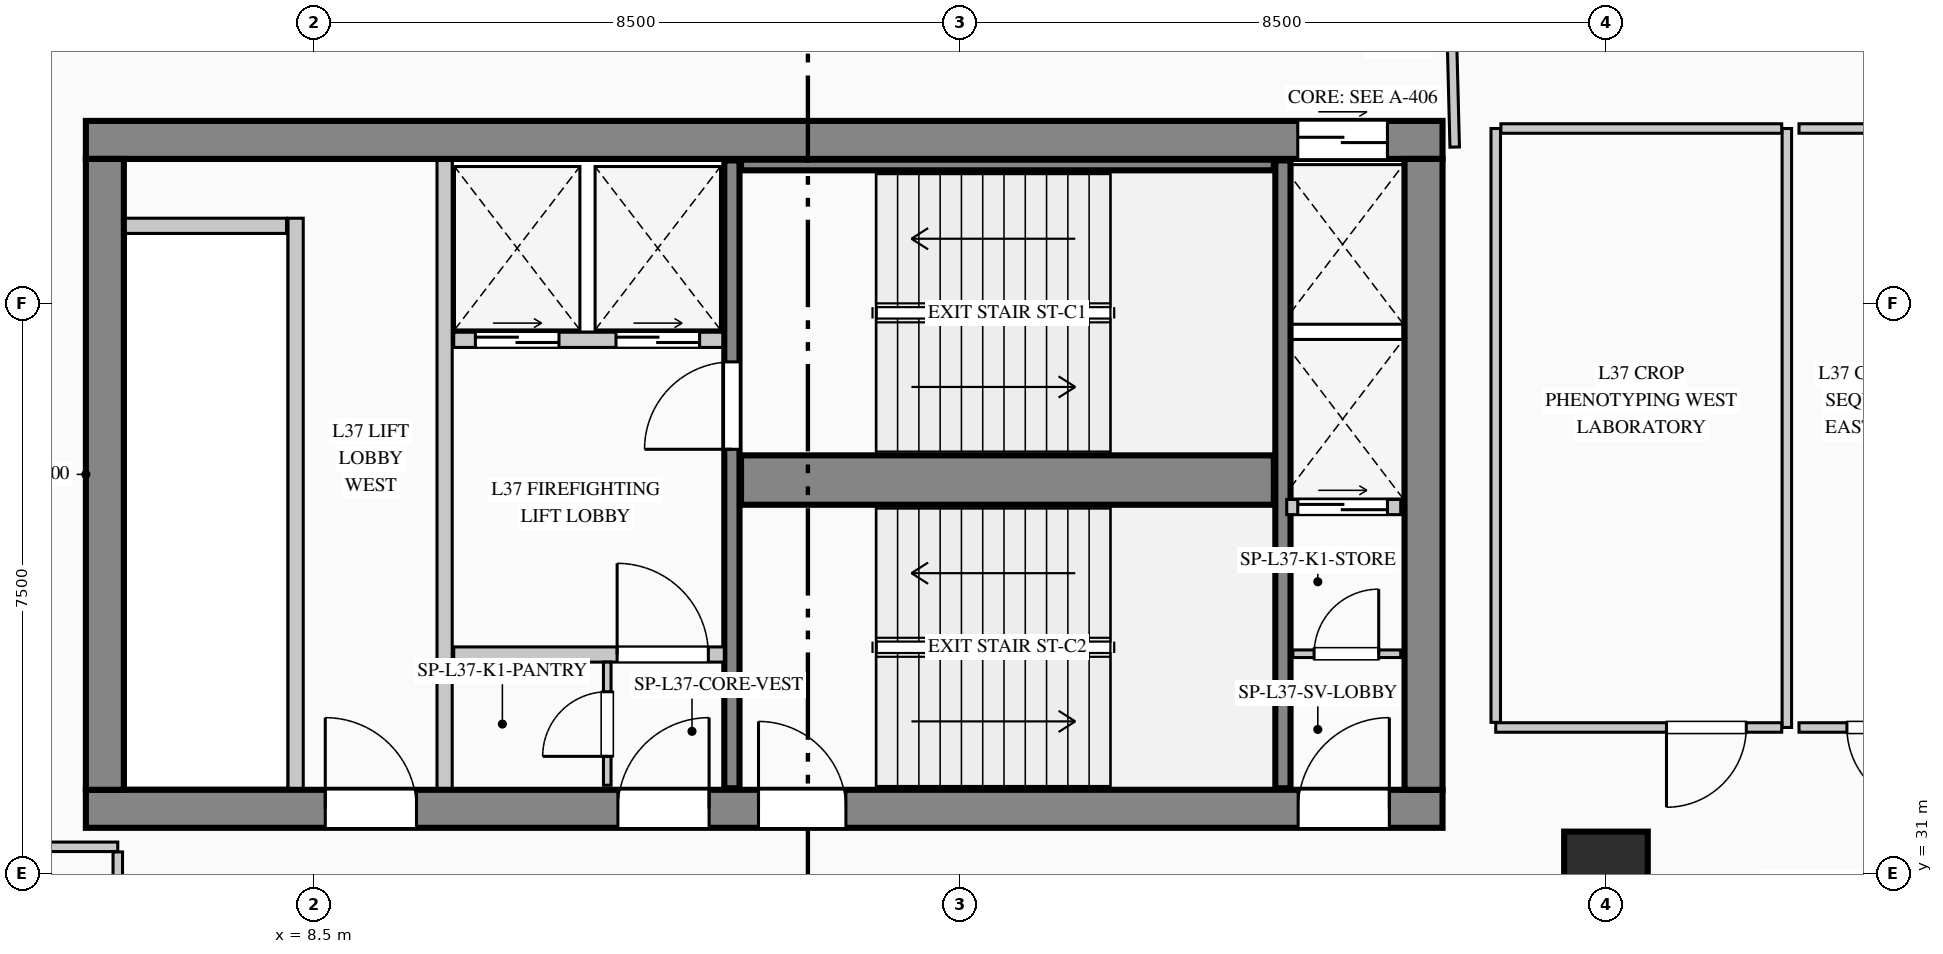
"""IFC4 building model, lengths in metres.
Left out: names, types, materials, properties, quantities, classifications, styles, units other than length and angle.
Written with IfcOpenShell. Run it as: python <this file> out.ifc"""

import sys

from ifc_helpers import new_model, si_unit, direction, frame, frame_2d, origin, origin_2d, place, context, subcontext, project, spatial, rectangle, extrude, element, fill, save


model = new_model("IFC4")
c1 = context("Model", 3, precision=1e-05, world=origin(), true_north=direction((0.0, 1.0)))
c2 = subcontext(c1, "Body", "Model", "MODEL_VIEW")
j1 = project(units=[si_unit("LENGTHUNIT", "METRE"), si_unit("PLANEANGLEUNIT", "RADIAN")], contexts=[c1])
p1 = place(None, origin())
s1 = spatial("IfcSite", under=j1, at=p1, CompositionType="ELEMENT")
p2 = place(p1, origin())
s2 = spatial("IfcBuilding", under=s1, at=p2, CompositionType="ELEMENT")
p3 = place(p2, frame((0.0, 0.0, 158.8)))
s3 = spatial("IfcBuildingStorey", under=s2, at=p3, CompositionType="ELEMENT", Elevation=158.8)
p4 = place(p3, frame((5.5, 40.65, 0.0), z_axis=(0.0, 0.0, 1.0), x_axis=(1.0, 0.0, 0.0)))
e1 = element("IfcWall", 1, at=p4, inside=s3, PredefinedType="SHEAR", context=c2, shape_type="SweptSolid", body=[
    extrude(rectangle(XDim=17.85, YDim=0.5, at=frame_2d((8.925, 0.0))), origin(), (0.0, 0.0, 1.0), 3.95),
])
p5 = place(p4, frame((15.945, 0.0, 0.0)))
e2 = element("IfcOpeningElement", 2, at=p5, cuts=e1, PredefinedType="OPENING", context=c2, shape_type="SweptSolid", body=[
    extrude(rectangle(XDim=1.18, YDim=2.25, at=frame_2d((0.59, 1.125))), frame((0.0, 0.26, 0.0), z_axis=(0.0, -1.0, 0.0), x_axis=(1.0, 0.0, 0.0)), (0.0, 0.0, 1.0), 0.52),
])
p6 = place(p3, frame((5.5, 31.85, 0.0), z_axis=(0.0, 0.0, 1.0), x_axis=(1.0, 0.0, 0.0)))
e3 = element("IfcWall", 3, at=p6, inside=s3, PredefinedType="SHEAR", context=c2, shape_type="SweptSolid", body=[
    extrude(rectangle(XDim=17.85, YDim=0.5, at=frame_2d((8.925, 0.0))), origin(), (0.0, 0.0, 1.0), 3.95),
])
p7 = place(p6, frame((3.15, 0.0, 0.0)))
e4 = element("IfcOpeningElement", 4, at=p7, cuts=e3, PredefinedType="OPENING", context=c2, shape_type="SweptSolid", body=[
    extrude(rectangle(XDim=1.2, YDim=2.2, at=frame_2d((0.6, 1.1))), frame((0.0, 0.26, 0.0), z_axis=(0.0, -1.0, 0.0), x_axis=(1.0, 0.0, 0.0)), (0.0, 0.0, 1.0), 0.52),
])
p8 = place(p6, frame((7.0, 0.0, 0.0)))
e5 = element("IfcOpeningElement", 5, at=p8, cuts=e3, PredefinedType="OPENING", context=c2, shape_type="SweptSolid", body=[
    extrude(rectangle(XDim=1.2, YDim=2.2, at=frame_2d((0.6, 1.1))), frame((0.0, 0.26, 0.0), z_axis=(0.0, -1.0, 0.0), x_axis=(1.0, 0.0, 0.0)), (0.0, 0.0, 1.0), 0.52),
])
p9 = place(p6, frame((8.85, 0.0, 0.0)))
e6 = element("IfcOpeningElement", 6, at=p9, cuts=e3, PredefinedType="OPENING", context=c2, shape_type="SweptSolid", body=[
    extrude(rectangle(XDim=1.15, YDim=2.2, at=frame_2d((0.575, 1.1))), frame((0.0, 0.26, 0.0), z_axis=(0.0, -1.0, 0.0), x_axis=(1.0, 0.0, 0.0)), (0.0, 0.0, 1.0), 0.52),
])
p10 = place(p6, frame((15.95, 0.0, 0.0)))
e7 = element("IfcOpeningElement", 7, at=p10, cuts=e3, PredefinedType="OPENING", context=c2, shape_type="SweptSolid", body=[
    extrude(rectangle(XDim=1.2, YDim=2.2, at=frame_2d((0.6, 1.1))), frame((0.0, 0.26, 0.0), z_axis=(0.0, -1.0, 0.0), x_axis=(1.0, 0.0, 0.0)), (0.0, 0.0, 1.0), 0.52),
])
for number, where, z_axis, x_axis in (
    (8, (5.75, 32.1, 0.0), (0.0, 0.0, 1.0), (0.0, 1.0, 0.0)),
    (9, (23.1, 32.1, 0.0), (0.0, 0.0, 1.0), (0.0, 1.0, 0.0)),
):
    element("IfcWall", number, at=place(p3, frame(where, z_axis=z_axis, x_axis=x_axis)), inside=s3, PredefinedType="SHEAR", context=c2, shape_type="SweptSolid", body=[
        extrude(rectangle(XDim=8.3, YDim=0.5, at=frame_2d((4.15, 0.0))), origin(), (0.0, 0.0, 1.0), 3.95),
    ])
p11 = place(p3, frame((14.0, 32.12, 0.0), z_axis=(0.0, 0.0, 1.0), x_axis=(0.0, 1.0, 0.0)))
e10 = element("IfcWall", 10, at=p11, inside=s3, PredefinedType="SHEAR", context=c2, shape_type="SweptSolid", body=[
    extrude(rectangle(XDim=8.26, YDim=0.2, at=frame_2d((4.13, 0.0))), origin(), (0.0, 0.0, 1.0), 3.95),
])
p12 = place(p11, frame((4.46, 0.0, 0.0)))
e11 = element("IfcOpeningElement", 11, at=p12, cuts=e10, PredefinedType="OPENING", context=c2, shape_type="SweptSolid", body=[
    extrude(rectangle(XDim=1.15, YDim=2.2, at=frame_2d((0.575, 1.1))), frame((0.0, 0.11, 0.0), z_axis=(0.0, -1.0, 0.0), x_axis=(1.0, 0.0, 0.0)), (0.0, 0.0, 1.0), 0.22),
])
p13 = place(p3, frame((14.12, 36.175, 0.0), z_axis=(0.0, 0.0, 1.0), x_axis=(1.0, 0.0, 0.0)))
e12 = element("IfcWall", 12, at=p13, inside=s3, PredefinedType="SHEAR", context=c2, shape_type="SweptSolid", body=[
    extrude(rectangle(XDim=7.01, YDim=0.65, at=frame_2d((3.505, 0.0))), origin(), (0.0, 0.0, 1.0), 3.95),
])
p14 = place(p3, frame((21.25, 32.12, 0.0), z_axis=(0.0, 0.0, 1.0), x_axis=(0.0, 1.0, 0.0)))
e13 = element("IfcWall", 13, at=p14, inside=s3, PredefinedType="SHEAR", context=c2, shape_type="SweptSolid", body=[
    extrude(rectangle(XDim=8.26, YDim=0.2, at=frame_2d((4.13, 0.0))), origin(), (0.0, 0.0, 1.0), 3.95),
])
p15 = place(p3, frame((14.12, 40.32, 0.0), z_axis=(0.0, 0.0, 1.0), x_axis=(1.0, 0.0, 0.0)))
e14 = element("IfcWall", 14, at=p15, inside=s3, PredefinedType="SHEAR", context=c2, shape_type="SweptSolid", body=[
    extrude(rectangle(XDim=7.01, YDim=0.14, at=frame_2d((3.505, 0.0))), origin(), (0.0, 0.0, 1.0), 3.95),
])
p16 = place(p3, frame((25.5, 31.0, 0.0), z_axis=(0.0, 0.0, 1.0), x_axis=(1.0, 0.0, 0.0)))
e15 = element("IfcColumn", 15, at=p16, inside=s3, PredefinedType="COLUMN", context=c2, shape_type="SweptSolid", body=[
    extrude(rectangle(XDim=1.1, YDim=1.1, at=origin_2d()), origin(), (0.0, 0.0, 1.0), 3.95),
])
p17 = place(p3, frame((7.993, 4.73, 0.0), z_axis=(0.0, 0.0, 1.0), x_axis=(-0.136989009016, 0.990572567462, 0.0)))
e16 = element("IfcWall", 16, at=p17, inside=s3, PredefinedType="STANDARD", context=c2, shape_type="SweptSolid", body=[
    extrude(rectangle(XDim=36.888, YDim=0.26, at=frame_2d((18.444, 0.0))), origin(), (0.0, 0.0, 1.0), 3.69),
])
p18 = place(p17, frame((20.748, 0.0, 0.9)))
e17 = element("IfcOpeningElement", 17, at=p18, cuts=e16, PredefinedType="OPENING", context=c2, shape_type="SweptSolid", body=[
    extrude(rectangle(XDim=2.1, YDim=2.0, at=frame_2d((1.05, 1.0))), frame((0.0, 0.14, 0.0), z_axis=(0.0, -1.0, 0.0), x_axis=(1.0, 0.0, 0.0)), (0.0, 0.0, 1.0), 0.28),
])
p19 = place(p3, frame((8.26, 32.12, 0.0), z_axis=(0.0, 0.0, 1.0), x_axis=(0.0, 1.0, 0.0)))
e18 = element("IfcWall", 18, at=p19, inside=s3, PredefinedType="PARTITIONING", context=c2, shape_type="SweptSolid", body=[
    extrude(rectangle(XDim=7.5, YDim=0.2, at=frame_2d((3.75, 0.0))), origin(), (0.0, 0.0, 1.0), 3.69),
])
p20 = place(p3, frame((6.02, 39.52, 0.0), z_axis=(0.0, 0.0, 1.0), x_axis=(1.0, 0.0, 0.0)))
e19 = element("IfcWall", 19, at=p20, inside=s3, PredefinedType="PARTITIONING", context=c2, shape_type="SweptSolid", body=[
    extrude(rectangle(XDim=2.12, YDim=0.2, at=frame_2d((1.06, 0.0))), origin(), (0.0, 0.0, 1.0), 3.69),
])
p21 = place(p3, frame((10.22, 32.12, 0.0), z_axis=(0.0, 0.0, 1.0), x_axis=(0.0, 1.0, 0.0)))
e20 = element("IfcWall", 20, at=p21, inside=s3, PredefinedType="PARTITIONING", context=c2, shape_type="SweptSolid", body=[
    extrude(rectangle(XDim=8.26, YDim=0.2, at=frame_2d((4.13, 0.0))), origin(), (0.0, 0.0, 1.0), 3.69),
])
p22 = place(p3, frame((10.34, 38.02, 0.0), z_axis=(0.0, 0.0, 1.0), x_axis=(1.0, 0.0, 0.0)))
e21 = element("IfcWall", 21, at=p22, inside=s3, PredefinedType="PARTITIONING", context=c2, shape_type="SweptSolid", body=[
    extrude(rectangle(XDim=3.54, YDim=0.2, at=frame_2d((1.77, 0.0))), origin(), (0.0, 0.0, 1.0), 3.69),
])
p23 = place(p22, frame((0.285, 0.0, 0.0)))
e22 = element("IfcOpeningElement", 22, at=p23, cuts=e21, PredefinedType="OPENING", context=c2, shape_type="SweptSolid", body=[
    extrude(rectangle(XDim=1.1, YDim=2.2, at=frame_2d((0.55, 1.1))), frame((0.0, 0.11, 0.0), z_axis=(0.0, -1.0, 0.0), x_axis=(1.0, 0.0, 0.0)), (0.0, 0.0, 1.0), 0.22),
])
p24 = place(p22, frame((2.135, 0.0, 0.0)))
e23 = element("IfcOpeningElement", 23, at=p24, cuts=e21, PredefinedType="OPENING", context=c2, shape_type="SweptSolid", body=[
    extrude(rectangle(XDim=1.1, YDim=2.2, at=frame_2d((0.55, 1.1))), frame((0.0, 0.11, 0.0), z_axis=(0.0, -1.0, 0.0), x_axis=(1.0, 0.0, 0.0)), (0.0, 0.0, 1.0), 0.22),
])
p25 = place(p3, frame((10.34, 33.88, 0.0), z_axis=(0.0, 0.0, 1.0), x_axis=(1.0, 0.0, 0.0)))
e24 = element("IfcWall", 24, at=p25, inside=s3, PredefinedType="PARTITIONING", context=c2, shape_type="SweptSolid", body=[
    extrude(rectangle(XDim=3.56, YDim=0.2, at=frame_2d((1.78, 0.0))), origin(), (0.0, 0.0, 1.0), 3.69),
])
p26 = place(p25, frame((2.15, 0.0, 0.0)))
e25 = element("IfcOpeningElement", 25, at=p26, cuts=e24, PredefinedType="OPENING", context=c2, shape_type="SweptSolid", body=[
    extrude(rectangle(XDim=1.2, YDim=2.2, at=frame_2d((0.6, 1.1))), frame((0.0, 0.11, 0.0), z_axis=(0.0, -1.0, 0.0), x_axis=(1.0, 0.0, 0.0)), (0.0, 0.0, 1.0), 0.22),
])
p27 = place(p3, frame((12.36, 32.16, 0.0), z_axis=(0.0, 0.0, 1.0), x_axis=(0.0, 1.0, 0.0)))
e26 = element("IfcWall", 26, at=p27, inside=s3, PredefinedType="PARTITIONING", context=c2, shape_type="SweptSolid", body=[
    extrude(rectangle(XDim=1.62, YDim=0.1, at=frame_2d((0.81, 0.0))), origin(), (0.0, 0.0, 1.0), 3.69),
])
p28 = place(p27, frame((0.38, 0.0, 0.0)))
e27 = element("IfcOpeningElement", 27, at=p28, cuts=e26, PredefinedType="OPENING", context=c2, shape_type="SweptSolid", body=[
    extrude(rectangle(XDim=0.85, YDim=2.1, at=frame_2d((0.425, 1.05))), frame((0.0, 0.06, 0.0), z_axis=(0.0, -1.0, 0.0), x_axis=(1.0, 0.0, 0.0)), (0.0, 0.0, 1.0), 0.12),
])
p29 = place(p3, frame((21.38, 33.89, 0.0), z_axis=(0.0, 0.0, 1.0), x_axis=(1.0, 0.0, 0.0)))
e28 = element("IfcWall", 28, at=p29, inside=s3, PredefinedType="PARTITIONING", context=c2, shape_type="SweptSolid", body=[
    extrude(rectangle(XDim=1.42, YDim=0.1, at=frame_2d((0.71, 0.0))), origin(), (0.0, 0.0, 1.0), 3.69),
])
p30 = place(p29, frame((0.28, 0.0, 0.0)))
e29 = element("IfcOpeningElement", 29, at=p30, cuts=e28, PredefinedType="OPENING", context=c2, shape_type="SweptSolid", body=[
    extrude(rectangle(XDim=0.85, YDim=2.1, at=frame_2d((0.425, 1.05))), frame((0.0, 0.06, 0.0), z_axis=(0.0, -1.0, 0.0), x_axis=(1.0, 0.0, 0.0)), (0.0, 0.0, 1.0), 0.12),
])
p31 = place(p3, frame((21.3, 35.82, 0.0), z_axis=(0.0, 0.0, 1.0), x_axis=(1.0, 0.0, 0.0)))
e30 = element("IfcWall", 30, at=p31, inside=s3, PredefinedType="PARTITIONING", context=c2, shape_type="SweptSolid", body=[
    extrude(rectangle(XDim=1.5, YDim=0.2, at=frame_2d((0.75, 0.0))), origin(), (0.0, 0.0, 1.0), 3.69),
])
p32 = place(p31, frame((0.145, 0.0, 0.0)))
e31 = element("IfcOpeningElement", 31, at=p32, cuts=e30, PredefinedType="OPENING", context=c2, shape_type="SweptSolid", body=[
    extrude(rectangle(XDim=1.18, YDim=2.25, at=frame_2d((0.59, 1.125))), frame((0.0, 0.11, 0.0), z_axis=(0.0, -1.0, 0.0), x_axis=(1.0, 0.0, 0.0)), (0.0, 0.0, 1.0), 0.22),
])
p33 = place(p3, frame((27.88, 40.8, 0.0), z_axis=(0.0, 0.0, 1.0), x_axis=(0.0, -1.0, 0.0)))
e32 = element("IfcWall", 32, at=p33, inside=s3, PredefinedType="PARTITIONING", context=c2, shape_type="SweptSolid", body=[
    extrude(rectangle(XDim=7.88, YDim=0.125, at=frame_2d((3.94, 0.0))), origin(), (0.0, 0.0, 1.0), 3.69),
])
p34 = place(p3, frame((27.812, 32.92, 0.0), z_axis=(0.0, 0.0, 1.0), x_axis=(-1.0, 0.0, 0.0)))
e33 = element("IfcWall", 33, at=p34, inside=s3, PredefinedType="PARTITIONING", context=c2, shape_type="SweptSolid", body=[
    extrude(rectangle(XDim=3.762, YDim=0.125, at=frame_2d((1.881, 0.0))), origin(), (0.0, 0.0, 1.0), 3.69),
])
p35 = place(p34, frame((0.466, 0.0, 0.0)))
e34 = element("IfcOpeningElement", 34, at=p35, cuts=e33, PredefinedType="OPENING", context=c2, shape_type="SweptSolid", body=[
    extrude(rectangle(XDim=1.05, YDim=2.15, at=frame_2d((0.525, 1.075))), frame((0.0, 0.073, 0.0), z_axis=(0.0, -1.0, 0.0), x_axis=(1.0, 0.0, 0.0)), (0.0, 0.0, 1.0), 0.145),
])
p36 = place(p3, frame((24.05, 32.988, 0.0), z_axis=(0.0, 0.0, 1.0), x_axis=(0.0, 1.0, 0.0)))
e35 = element("IfcWall", 35, at=p36, inside=s3, PredefinedType="PARTITIONING", context=c2, shape_type="SweptSolid", body=[
    extrude(rectangle(XDim=7.812, YDim=0.125, at=frame_2d((3.906, 0.0))), origin(), (0.0, 0.0, 1.0), 3.69),
])
p37 = place(p3, frame((24.117, 40.8, 0.0), z_axis=(0.0, 0.0, 1.0), x_axis=(1.0, 0.0, 0.0)))
e36 = element("IfcWall", 36, at=p37, inside=s3, PredefinedType="PARTITIONING", context=c2, shape_type="SweptSolid", body=[
    extrude(rectangle(XDim=3.695, YDim=0.125, at=frame_2d((1.848, 0.0))), origin(), (0.0, 0.0, 1.0), 3.69),
])
p38 = place(p3, frame((30.35, 32.92, 0.0), z_axis=(0.0, 0.0, 1.0), x_axis=(-1.0, 0.0, 0.0)))
e37 = element("IfcWall", 37, at=p38, inside=s3, PredefinedType="PARTITIONING", context=c2, shape_type="SweptSolid", body=[
    extrude(rectangle(XDim=2.31, YDim=0.125, at=frame_2d((1.155, 0.0))), origin(), (0.0, 0.0, 1.0), 3.69),
])
p39 = place(p38, frame((0.63, 0.0, 0.0)))
e38 = element("IfcOpeningElement", 38, at=p39, cuts=e37, PredefinedType="OPENING", context=c2, shape_type="SweptSolid", body=[
    extrude(rectangle(XDim=1.05, YDim=2.15, at=frame_2d((0.525, 1.075))), frame((0.0, 0.073, 0.0), z_axis=(0.0, -1.0, 0.0), x_axis=(1.0, 0.0, 0.0)), (0.0, 0.0, 1.0), 0.145),
])
p40 = place(p3, frame((28.04, 40.8, 0.0), z_axis=(0.0, 0.0, 1.0), x_axis=(1.0, 0.0, 0.0)))
e39 = element("IfcWall", 39, at=p40, inside=s3, PredefinedType="PARTITIONING", context=c2, shape_type="SweptSolid", body=[
    extrude(rectangle(XDim=2.31, YDim=0.125, at=frame_2d((1.155, 0.0))), origin(), (0.0, 0.0, 1.0), 3.69),
])
p41 = place(p3, frame((4.448, 31.35, 0.0), z_axis=(0.0, 0.0, 1.0), x_axis=(1.0, 0.0, 0.0)))
e40 = element("IfcWall", 40, at=p41, inside=s3, PredefinedType="PARTITIONING", context=c2, shape_type="SweptSolid", body=[
    extrude(rectangle(XDim=1.472, YDim=0.125, at=frame_2d((0.736, 0.0))), origin(), (0.0, 0.0, 1.0), 3.69),
])
p42 = place(p3, frame((5.92, 31.282, 0.0), z_axis=(0.0, 0.0, 1.0), x_axis=(0.0, -1.0, 0.0)))
e41 = element("IfcWall", 41, at=p42, inside=s3, PredefinedType="PARTITIONING", context=c2, shape_type="SweptSolid", body=[
    extrude(rectangle(XDim=2.682, YDim=0.125, at=frame_2d((1.341, 0.0))), origin(), (0.0, 0.0, 1.0), 3.69),
])
p43 = place(p3, frame((23.51, 40.556, 0.0), z_axis=(0.0, 0.0, 1.0), x_axis=(-0.02567646332, 0.999670305266, 0.0)))
e42 = element("IfcWall", 42, at=p43, inside=s3, PredefinedType="PARTITIONING", context=c2, shape_type="SweptSolid", body=[
    extrude(rectangle(XDim=2.71, YDim=0.125, at=frame_2d((1.355, 0.0))), origin(), (0.0, 0.0, 1.0), 3.69),
])
p44 = place(p7, origin())
e43 = element("IfcDoor", 43, at=p44, inside=s3, OperationType="SINGLE_SWING_LEFT", PredefinedType="DOOR", context=c2, shape_type="SweptSolid", body=[
    extrude(rectangle(XDim=1.2, YDim=2.2, at=frame_2d((0.6, 1.1))), frame((0.0, 0.025, 0.0), z_axis=(0.0, -1.0, 0.0), x_axis=(1.0, 0.0, 0.0)), (0.0, 0.0, 1.0), 0.05),
])
fill(e4, e43)
p45 = place(p8, origin())
e44 = element("IfcDoor", 44, at=p45, inside=s3, OperationType="SINGLE_SWING_RIGHT", PredefinedType="DOOR", context=c2, shape_type="SweptSolid", body=[
    extrude(rectangle(XDim=1.2, YDim=2.2, at=frame_2d((0.6, 1.1))), frame((0.0, 0.025, 0.0), z_axis=(0.0, -1.0, 0.0), x_axis=(1.0, 0.0, 0.0)), (0.0, 0.0, 1.0), 0.05),
])
fill(e5, e44)
p46 = place(p9, origin())
e45 = element("IfcDoor", 45, at=p46, inside=s3, OperationType="SINGLE_SWING_LEFT", PredefinedType="DOOR", context=c2, shape_type="SweptSolid", body=[
    extrude(rectangle(XDim=1.15, YDim=2.2, at=frame_2d((0.575, 1.1))), frame((0.0, 0.025, 0.0), z_axis=(0.0, -1.0, 0.0), x_axis=(1.0, 0.0, 0.0)), (0.0, 0.0, 1.0), 0.05),
])
fill(e6, e45)
p47 = place(p10, origin())
e46 = element("IfcDoor", 46, at=p47, inside=s3, OperationType="SINGLE_SWING_RIGHT", PredefinedType="DOOR", context=c2, shape_type="SweptSolid", body=[
    extrude(rectangle(XDim=1.2, YDim=2.2, at=frame_2d((0.6, 1.1))), frame((0.0, 0.025, 0.0), z_axis=(0.0, -1.0, 0.0), x_axis=(1.0, 0.0, 0.0)), (0.0, 0.0, 1.0), 0.05),
])
fill(e7, e46)
p48 = place(p26, origin())
e47 = element("IfcDoor", 47, at=p48, inside=s3, OperationType="SINGLE_SWING_LEFT", PredefinedType="DOOR", context=c2, shape_type="SweptSolid", body=[
    extrude(rectangle(XDim=1.2, YDim=2.2, at=frame_2d((0.6, 1.1))), frame((0.0, 0.025, 0.0), z_axis=(0.0, -1.0, 0.0), x_axis=(1.0, 0.0, 0.0)), (0.0, 0.0, 1.0), 0.05),
])
fill(e25, e47)
p49 = place(p28, origin())
e48 = element("IfcDoor", 48, at=p49, inside=s3, OperationType="SINGLE_SWING_LEFT", PredefinedType="DOOR", context=c2, shape_type="SweptSolid", body=[
    extrude(rectangle(XDim=0.85, YDim=2.1, at=frame_2d((0.425, 1.05))), frame((0.0, 0.025, 0.0), z_axis=(0.0, -1.0, 0.0), x_axis=(1.0, 0.0, 0.0)), (0.0, 0.0, 1.0), 0.05),
])
fill(e27, e48)
p50 = place(p30, origin())
e49 = element("IfcDoor", 49, at=p50, inside=s3, OperationType="SINGLE_SWING_RIGHT", PredefinedType="DOOR", context=c2, shape_type="SweptSolid", body=[
    extrude(rectangle(XDim=0.85, YDim=2.1, at=frame_2d((0.425, 1.05))), frame((0.0, 0.025, 0.0), z_axis=(0.0, -1.0, 0.0), x_axis=(1.0, 0.0, 0.0)), (0.0, 0.0, 1.0), 0.05),
])
fill(e29, e49)
p51 = place(p12, origin())
e50 = element("IfcDoor", 50, at=p51, inside=s3, OperationType="SINGLE_SWING_LEFT", PredefinedType="DOOR", context=c2, shape_type="SweptSolid", body=[
    extrude(rectangle(XDim=1.15, YDim=2.2, at=frame_2d((0.575, 1.1))), frame((0.0, 0.025, 0.0), z_axis=(0.0, -1.0, 0.0), x_axis=(1.0, 0.0, 0.0)), (0.0, 0.0, 1.0), 0.05),
])
fill(e11, e50)
p52 = place(p23, origin())
e51 = element("IfcDoor", 51, at=p52, inside=s3, OperationType="DOUBLE_DOOR_SLIDING", PredefinedType="DOOR", context=c2, shape_type="SweptSolid", body=[
    extrude(rectangle(XDim=1.1, YDim=2.2, at=frame_2d((0.55, 1.1))), frame((0.0, 0.025, 0.0), z_axis=(0.0, -1.0, 0.0), x_axis=(1.0, 0.0, 0.0)), (0.0, 0.0, 1.0), 0.05),
])
fill(e22, e51)
p53 = place(p24, origin())
e52 = element("IfcDoor", 52, at=p53, inside=s3, OperationType="DOUBLE_DOOR_SLIDING", PredefinedType="DOOR", context=c2, shape_type="SweptSolid", body=[
    extrude(rectangle(XDim=1.1, YDim=2.2, at=frame_2d((0.55, 1.1))), frame((0.0, 0.025, 0.0), z_axis=(0.0, -1.0, 0.0), x_axis=(1.0, 0.0, 0.0)), (0.0, 0.0, 1.0), 0.05),
])
fill(e23, e52)
p54 = place(p5, origin())
e53 = element("IfcDoor", 53, at=p54, inside=s3, OperationType="DOUBLE_DOOR_SLIDING", PredefinedType="DOOR", context=c2, shape_type="SweptSolid", body=[
    extrude(rectangle(XDim=1.18, YDim=2.25, at=frame_2d((0.59, 1.125))), frame((0.0, 0.025, 0.0), z_axis=(0.0, -1.0, 0.0), x_axis=(1.0, 0.0, 0.0)), (0.0, 0.0, 1.0), 0.05),
])
fill(e2, e53)
p55 = place(p32, origin())
e54 = element("IfcDoor", 54, at=p55, inside=s3, OperationType="DOUBLE_DOOR_SLIDING", PredefinedType="DOOR", context=c2, shape_type="SweptSolid", body=[
    extrude(rectangle(XDim=1.18, YDim=2.25, at=frame_2d((0.59, 1.125))), frame((0.0, 0.025, 0.0), z_axis=(0.0, -1.0, 0.0), x_axis=(1.0, 0.0, 0.0)), (0.0, 0.0, 1.0), 0.05),
])
fill(e31, e54)
p56 = place(p35, origin())
e55 = element("IfcDoor", 55, at=p56, inside=s3, OperationType="SINGLE_SWING_RIGHT", PredefinedType="DOOR", context=c2, shape_type="SweptSolid", body=[
    extrude(rectangle(XDim=1.05, YDim=2.15, at=frame_2d((0.525, 1.075))), frame((0.0, 0.025, 0.0), z_axis=(0.0, -1.0, 0.0), x_axis=(1.0, 0.0, 0.0)), (0.0, 0.0, 1.0), 0.05),
])
fill(e34, e55)
p57 = place(p39, origin())
e56 = element("IfcDoor", 56, at=p57, inside=s3, OperationType="SINGLE_SWING_LEFT", PredefinedType="DOOR", context=c2, shape_type="SweptSolid", body=[
    extrude(rectangle(XDim=1.05, YDim=2.15, at=frame_2d((0.525, 1.075))), frame((0.0, 0.025, 0.0), z_axis=(0.0, -1.0, 0.0), x_axis=(1.0, 0.0, 0.0)), (0.0, 0.0, 1.0), 0.05),
])
fill(e38, e56)
save(model, sys.argv[1])
